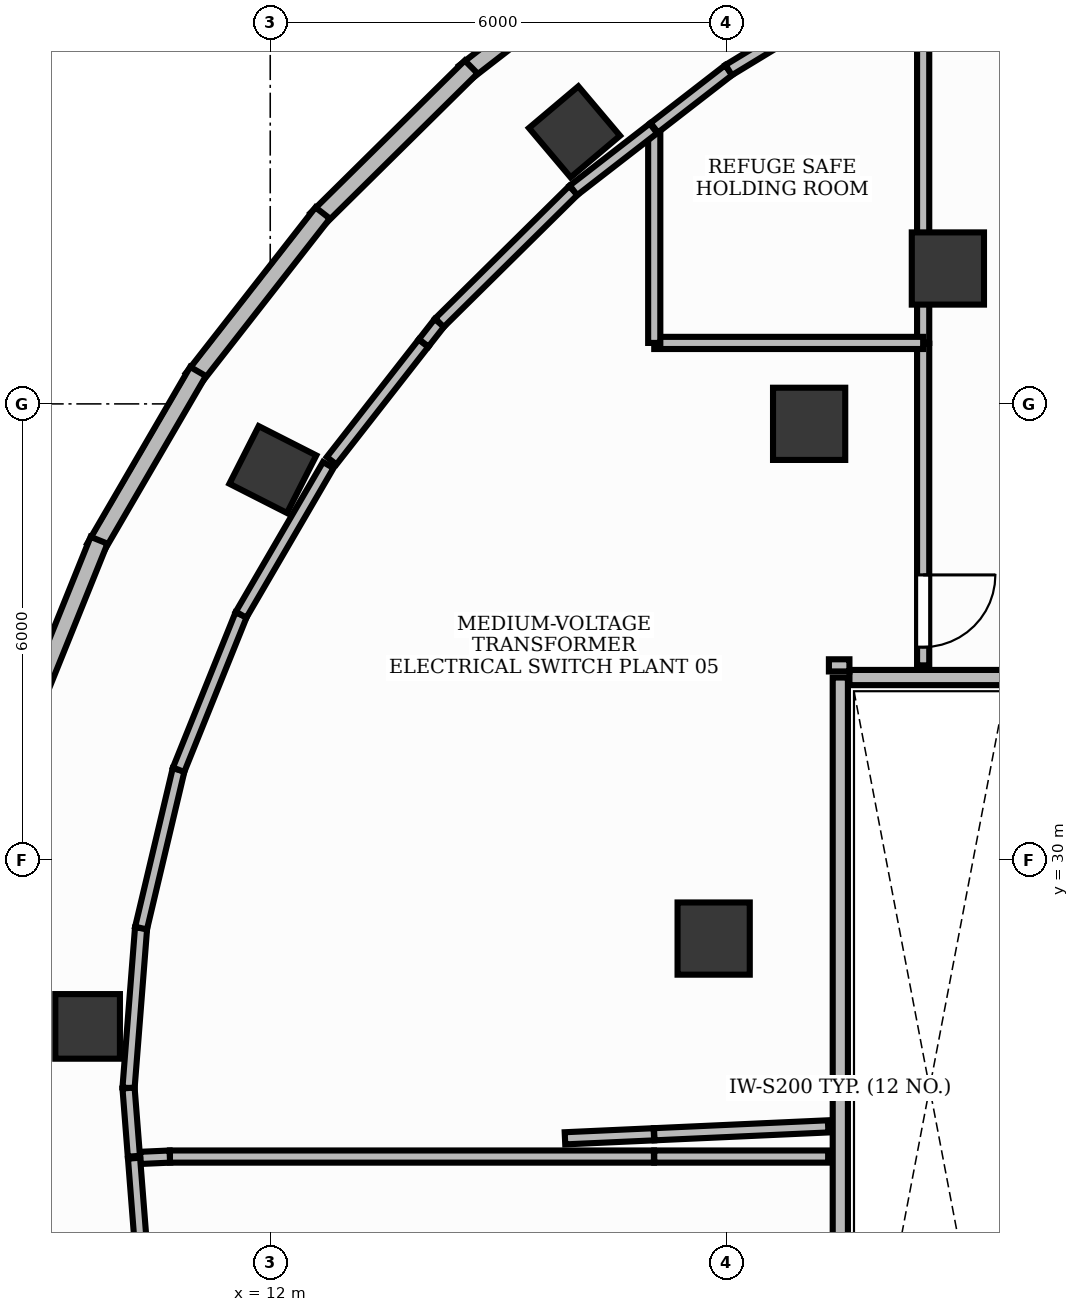
"""IFC4 building model, lengths in metres.
Left out: names, types, materials, properties, quantities, classifications, styles, units other than length and angle.
Written with IfcOpenShell. Run it as: python <this file> out.ifc"""

import sys

from ifc_helpers import new_model, si_unit, direction, frame, frame_2d, origin, origin_2d, place, context, subcontext, project, spatial, rectangle, extrude, element, fill, save


model = new_model("IFC4")
c1 = context("Model", 3, precision=1e-05, world=origin(), true_north=direction((0.0, 1.0)))
c2 = subcontext(c1, "Body", "Model", "MODEL_VIEW")
j1 = project(units=[si_unit("LENGTHUNIT", "METRE"), si_unit("PLANEANGLEUNIT", "RADIAN")], contexts=[c1])
p1 = place(None, origin())
s1 = spatial("IfcSite", under=j1, at=p1, CompositionType="ELEMENT")
p2 = place(p1, origin())
s2 = spatial("IfcBuilding", under=s1, at=p2, CompositionType="ELEMENT")
p3 = place(p2, frame((0.0, 0.0, 277.2)))
s3 = spatial("IfcBuildingStorey", under=s2, at=p3, CompositionType="ELEMENT", Elevation=277.2)
p4 = place(p3, frame((16.003, 39.579, -0.0), z_axis=(0.0, 0.0, 1.0), x_axis=(0.764246456939, 0.644924300253, 0.0)))
e1 = element("IfcColumn", 1, at=p4, inside=s3, PredefinedType="COLUMN", context=c2, shape_type="SweptSolid", body=[
    extrude(rectangle(XDim=0.85, YDim=0.85, at=origin_2d()), origin(), (0.0, 0.0, 1.0), 5.101),
])
p5 = place(p3, frame((20.915, 37.781, -0.0), z_axis=(0.0, 0.0, 1.0), x_axis=(1.0, 0.0, 0.0)))
e2 = element("IfcColumn", 2, at=p5, inside=s3, PredefinedType="COLUMN", context=c2, shape_type="SweptSolid", body=[
    extrude(rectangle(XDim=0.95, YDim=0.95, at=origin_2d()), origin(), (0.0, 0.0, 1.0), 5.101),
])
p6 = place(p3, frame((12.034, 35.136, -0.0), z_axis=(0.0, 0.0, 1.0), x_axis=(0.453057191132, 0.891481453292, 0.0)))
e3 = element("IfcColumn", 3, at=p6, inside=s3, PredefinedType="COLUMN", context=c2, shape_type="SweptSolid", body=[
    extrude(rectangle(XDim=0.85, YDim=0.85, at=origin_2d()), origin(), (0.0, 0.0, 1.0), 5.101),
])
p7 = place(p3, frame((19.09, 35.738, -0.0), z_axis=(0.0, 0.0, 1.0), x_axis=(1.0, 0.0, 0.0)))
e4 = element("IfcColumn", 4, at=p7, inside=s3, PredefinedType="COLUMN", context=c2, shape_type="SweptSolid", body=[
    extrude(rectangle(XDim=0.95, YDim=0.95, at=origin_2d()), origin(), (0.0, 0.0, 1.0), 5.101),
])
p8 = place(p3, frame((9.597, 27.81, -0.0), z_axis=(0.0, 0.0, 1.0), x_axis=(0.0, 1.0, 0.0)))
e5 = element("IfcColumn", 5, at=p8, inside=s3, PredefinedType="COLUMN", context=c2, shape_type="SweptSolid", body=[
    extrude(rectangle(XDim=0.85, YDim=0.85, at=origin_2d()), origin(), (0.0, 0.0, 1.0), 5.101),
])
p9 = place(p3, frame((17.834, 28.966, -0.0), z_axis=(0.0, 0.0, 1.0), x_axis=(1.0, 0.0, 0.0)))
e6 = element("IfcColumn", 6, at=p9, inside=s3, PredefinedType="COLUMN", context=c2, shape_type="SweptSolid", body=[
    extrude(rectangle(XDim=0.95, YDim=0.95, at=origin_2d()), origin(), (0.0, 0.0, 1.0), 5.101),
])
p10 = place(p3, frame((16.884, 42.159, 0.0), z_axis=(0.0, 0.0, 1.0), x_axis=(-0.790494374307, -0.61246930061, 0.0)))
e7 = element("IfcWall", 7, at=p10, inside=s3, PredefinedType="STANDARD", context=c2, shape_type="SweptSolid", body=[
    extrude(rectangle(XDim=2.943, YDim=0.24, at=frame_2d((1.471, 0.0))), origin(), (0.0, 0.0, 1.0), 5.1),
])
p11 = place(p3, frame((14.644, 40.432, 0.0), z_axis=(0.0, 0.0, 1.0), x_axis=(-0.711370453411, -0.702817243679, 0.0)))
e8 = element("IfcWall", 8, at=p11, inside=s3, PredefinedType="STANDARD", context=c2, shape_type="SweptSolid", body=[
    extrude(rectangle(XDim=2.854, YDim=0.24, at=frame_2d((1.427, 0.0))), origin(), (0.0, 0.0, 1.0), 5.1),
])
p12 = place(p3, frame((12.69, 38.512, 0.0), z_axis=(0.0, 0.0, 1.0), x_axis=(-0.615782644102, -0.78791607118, 0.0)))
e9 = element("IfcWall", 9, at=p12, inside=s3, PredefinedType="STANDARD", context=c2, shape_type="SweptSolid", body=[
    extrude(rectangle(XDim=2.769, YDim=0.24, at=frame_2d((1.384, 0.0))), origin(), (0.0, 0.0, 1.0), 5.1),
])
p13 = place(p3, frame((11.05, 36.427, 0.0), z_axis=(0.0, 0.0, 1.0), x_axis=(-0.503109244551, -0.864222823147, 0.0)))
e10 = element("IfcWall", 10, at=p13, inside=s3, PredefinedType="STANDARD", context=c2, shape_type="SweptSolid", body=[
    extrude(rectangle(XDim=2.691, YDim=0.24, at=frame_2d((1.345, 0.0))), origin(), (0.0, 0.0, 1.0), 5.1),
])
p14 = place(p3, frame((9.748, 34.206, 0.0), z_axis=(0.0, 0.0, 1.0), x_axis=(-0.373969625134, -0.927440952016, 0.0)))
e11 = element("IfcWall", 11, at=p14, inside=s3, PredefinedType="STANDARD", context=c2, shape_type="SweptSolid", body=[
    extrude(rectangle(XDim=2.626, YDim=0.24, at=frame_2d((1.313, 0.0))), origin(), (0.0, 0.0, 1.0), 5.1),
])
p15 = place(p3, frame((19.5, 21.6, 0.0), z_axis=(0.0, 0.0, 1.0), x_axis=(0.0, 1.0, 0.0)))
e12 = element("IfcWall", 12, at=p15, inside=s3, PredefinedType="PARTITIONING", context=c2, shape_type="SweptSolid", body=[
    extrude(rectangle(XDim=10.8, YDim=0.2, at=frame_2d((5.4, 0.0))), origin(), (0.0, 0.0, 1.0), 3.41),
])
p16 = place(p3, frame((19.62, 32.4, 0.0), z_axis=(0.0, 0.0, 1.0), x_axis=(1.0, 0.0, 0.0)))
e13 = element("IfcWall", 13, at=p16, inside=s3, PredefinedType="PARTITIONING", context=c2, shape_type="SweptSolid", body=[
    extrude(rectangle(XDim=2.11, YDim=0.2, at=frame_2d((1.055, 0.0))), origin(), (0.0, 0.0, 1.0), 3.41),
])
p17 = place(p3, frame((20.59, 36.792, 0.0), z_axis=(0.0, 0.0, 1.0), x_axis=(0.0, -1.0, 0.0)))
e14 = element("IfcWall", 14, at=p17, inside=s3, PredefinedType="PARTITIONING", context=c2, shape_type="SweptSolid", body=[
    extrude(rectangle(XDim=4.232, YDim=0.16, at=frame_2d((2.116, 0.0))), origin(), (0.0, 0.0, 1.0), 3.41),
])
p18 = place(p17, frame((3.042, 0.0, 0.0)))
e15 = element("IfcOpeningElement", 15, at=p18, cuts=e14, PredefinedType="OPENING", context=c2, shape_type="SweptSolid", body=[
    extrude(rectangle(XDim=0.95, YDim=2.15, at=frame_2d((0.475, 1.075))), frame((0.0, 0.095, 0.0), z_axis=(0.0, -1.0, 0.0), x_axis=(1.0, 0.0, 0.0)), (0.0, 0.0, 1.0), 0.19),
])
p19 = place(p3, frame((10.291, 26.08, 0.0), z_axis=(0.0, 0.0, 1.0), x_axis=(0.998982696556, 0.045095143669, 0.0)))
e16 = element("IfcWall", 16, at=p19, inside=s3, PredefinedType="PARTITIONING", context=c2, shape_type="SweptSolid", body=[
    extrude(rectangle(XDim=0.39, YDim=0.16, at=frame_2d((0.195, 0.0))), origin(), (0.0, 0.0, 1.0), 3.41),
])
p20 = place(p3, frame((10.681, 26.098, 0.0), z_axis=(0.0, 0.0, 1.0), x_axis=(1.0, 0.0, 0.0)))
e17 = element("IfcWall", 17, at=p20, inside=s3, PredefinedType="PARTITIONING", context=c2, shape_type="SweptSolid", body=[
    extrude(rectangle(XDim=6.367, YDim=0.16, at=frame_2d((3.184, 0.0))), origin(), (0.0, 0.0, 1.0), 3.41),
])
p21 = place(p3, frame((17.052, 26.098, 0.0), z_axis=(0.0, 0.0, 1.0), x_axis=(1.0, 0.0, 0.0)))
e18 = element("IfcWall", 18, at=p21, inside=s3, PredefinedType="PARTITIONING", context=c2, shape_type="SweptSolid", body=[
    extrude(rectangle(XDim=2.288, YDim=0.16, at=frame_2d((1.144, 0.0))), origin(), (0.0, 0.0, 1.0), 3.41),
])
p22 = place(p3, frame((10.301, 24.896, 0.0), z_axis=(0.0, 0.0, 1.0), x_axis=(-0.078179185526, 0.996939323605, 0.0)))
e19 = element("IfcWall", 19, at=p22, inside=s3, PredefinedType="PARTITIONING", context=c2, shape_type="SweptSolid", body=[
    extrude(rectangle(XDim=1.184, YDim=0.16, at=frame_2d((0.592, 0.0))), origin(), (0.0, 0.0, 1.0), 3.41),
])
p23 = place(p3, frame((20.59, 40.8, 0.0), z_axis=(0.0, 0.0, 1.0), x_axis=(0.0, -1.0, 0.0)))
e20 = element("IfcWall", 20, at=p23, inside=s3, PredefinedType="PARTITIONING", context=c2, shape_type="SweptSolid", body=[
    extrude(rectangle(XDim=3.998, YDim=0.16, at=frame_2d((1.999, 0.0))), origin(), (0.0, 0.0, 1.0), 3.41),
])
p24 = place(p3, frame((20.59, 36.802, 0.0), z_axis=(0.0, 0.0, 1.0), x_axis=(-1.0, 0.0, 0.0)))
e21 = element("IfcWall", 21, at=p24, inside=s3, PredefinedType="PARTITIONING", context=c2, shape_type="SweptSolid", body=[
    extrude(rectangle(XDim=3.538, YDim=0.16, at=frame_2d((1.769, 0.0))), origin(), (0.0, 0.0, 1.0), 3.41),
])
p25 = place(p3, frame((17.052, 36.802, 0.0), z_axis=(0.0, 0.0, 1.0), x_axis=(0.0, 1.0, 0.0)))
e22 = element("IfcWall", 22, at=p25, inside=s3, PredefinedType="PARTITIONING", context=c2, shape_type="SweptSolid", body=[
    extrude(rectangle(XDim=2.831, YDim=0.16, at=frame_2d((1.415, 0.0))), origin(), (0.0, 0.0, 1.0), 3.41),
])
p26 = place(p3, frame((17.052, 39.633, 0.0), z_axis=(0.0, 0.0, 1.0), x_axis=(0.790443669582, 0.612534737969, 0.0)))
e23 = element("IfcWall", 23, at=p26, inside=s3, PredefinedType="PARTITIONING", context=c2, shape_type="SweptSolid", body=[
    extrude(rectangle(XDim=1.239, YDim=0.16, at=frame_2d((0.62, 0.0))), origin(), (0.0, 0.0, 1.0), 3.41),
])
p27 = place(p3, frame((18.031, 40.392, 0.0), z_axis=(0.0, 0.0, 1.0), x_axis=(0.854517984413, 0.519421807701, 0.0)))
e24 = element("IfcWall", 24, at=p27, inside=s3, PredefinedType="PARTITIONING", context=c2, shape_type="SweptSolid", body=[
    extrude(rectangle(XDim=2.685, YDim=0.16, at=frame_2d((1.342, 0.0))), origin(), (0.0, 0.0, 1.0), 3.41),
])
p28 = place(p3, frame((10.136, 27.0, 0.0), z_axis=(0.0, 0.0, 1.0), x_axis=(0.078103302944, 0.996945271351, 0.0)))
e25 = element("IfcWall", 25, at=p28, inside=s3, PredefinedType="PARTITIONING", context=c2, shape_type="SweptSolid", body=[
    extrude(rectangle(XDim=2.11, YDim=0.16, at=frame_2d((1.055, 0.0))), origin(), (0.0, 0.0, 1.0), 3.41),
])
p29 = place(p3, frame((10.301, 29.104, 0.0), z_axis=(0.0, 0.0, 1.0), x_axis=(0.230736371134, 0.973016303582, 0.0)))
e26 = element("IfcWall", 26, at=p29, inside=s3, PredefinedType="PARTITIONING", context=c2, shape_type="SweptSolid", body=[
    extrude(rectangle(XDim=2.141, YDim=0.16, at=frame_2d((1.07, 0.0))), origin(), (0.0, 0.0, 1.0), 3.41),
])
p30 = place(p3, frame((10.794, 31.187, 0.0), z_axis=(0.0, 0.0, 1.0), x_axis=(0.373992983989, 0.927431532743, 0.0)))
e27 = element("IfcWall", 27, at=p30, inside=s3, PredefinedType="PARTITIONING", context=c2, shape_type="SweptSolid", body=[
    extrude(rectangle(XDim=2.199, YDim=0.16, at=frame_2d((1.099, 0.0))), origin(), (0.0, 0.0, 1.0), 3.41),
])
p31 = place(p3, frame((11.617, 33.226, 0.0), z_axis=(0.0, 0.0, 1.0), x_axis=(0.503091477378, 0.864233166101, 0.0)))
e28 = element("IfcWall", 28, at=p31, inside=s3, PredefinedType="PARTITIONING", context=c2, shape_type="SweptSolid", body=[
    extrude(rectangle(XDim=2.279, YDim=0.16, at=frame_2d((1.139, 0.0))), origin(), (0.0, 0.0, 1.0), 3.41),
])
p32 = place(p3, frame((12.808, 35.252, 0.0), z_axis=(0.0, 0.0, 1.0), x_axis=(0.615774471154, 0.787922458542, 0.0)))
e29 = element("IfcWall", 29, at=p32, inside=s3, PredefinedType="PARTITIONING", context=c2, shape_type="SweptSolid", body=[
    extrude(rectangle(XDim=1.961, YDim=0.16, at=frame_2d((0.981, 0.0))), origin(), (0.0, 0.0, 1.0), 3.41),
])
p33 = place(p3, frame((14.019, 36.802, 0.0), z_axis=(0.0, 0.0, 1.0), x_axis=(0.615799042006, 0.787903255397, 0.0)))
e30 = element("IfcWall", 30, at=p33, inside=s3, PredefinedType="PARTITIONING", context=c2, shape_type="SweptSolid", body=[
    extrude(rectangle(XDim=0.336, YDim=0.16, at=frame_2d((0.168, 0.0))), origin(), (0.0, 0.0, 1.0), 3.41),
])
p34 = place(p3, frame((14.226, 37.067, 0.0), z_axis=(0.0, 0.0, 1.0), x_axis=(0.711428467845, 0.702758518369, 0.0)))
e31 = element("IfcWall", 31, at=p34, inside=s3, PredefinedType="PARTITIONING", context=c2, shape_type="SweptSolid", body=[
    extrude(rectangle(XDim=2.478, YDim=0.16, at=frame_2d((1.239, 0.0))), origin(), (0.0, 0.0, 1.0), 3.41),
])
p35 = place(p3, frame((15.989, 38.809, 0.0), z_axis=(0.0, 0.0, 1.0), x_axis=(0.790486056545, 0.612480035927, 0.0)))
e32 = element("IfcWall", 32, at=p35, inside=s3, PredefinedType="PARTITIONING", context=c2, shape_type="SweptSolid", body=[
    extrude(rectangle(XDim=1.332, YDim=0.16, at=frame_2d((0.666, 0.0))), origin(), (0.0, 0.0, 1.0), 3.41),
])
p36 = place(p3, frame((19.62, 32.56, 0.0), z_axis=(0.0, 0.0, 1.0), x_axis=(-1.0, 0.0, 0.0)))
e33 = element("IfcWall", 33, at=p36, inside=s3, PredefinedType="PARTITIONING", context=c2, shape_type="SweptSolid", body=[
    extrude(rectangle(XDim=0.27, YDim=0.16, at=frame_2d((0.135, 0.0))), origin(), (0.0, 0.0, 1.0), 3.41),
])
p37 = place(p3, frame((19.34, 26.495, 0.0), z_axis=(0.0, 0.0, 1.0), x_axis=(-0.99897293198, -0.04531093875, 0.0)))
e34 = element("IfcWall", 34, at=p37, inside=s3, PredefinedType="PARTITIONING", context=c2, shape_type="SweptSolid", body=[
    extrude(rectangle(XDim=2.29, YDim=0.16, at=frame_2d((1.145, 0.0))), origin(), (0.0, 0.0, 1.0), 3.41),
])
p38 = place(p3, frame((17.048, 26.391, 0.0), z_axis=(0.0, 0.0, 1.0), x_axis=(-0.998967680738, -0.045426565374, 0.0)))
e35 = element("IfcWall", 35, at=p38, inside=s3, PredefinedType="PARTITIONING", context=c2, shape_type="SweptSolid", body=[
    extrude(rectangle(XDim=1.172, YDim=0.16, at=frame_2d((0.586, 0.0))), origin(), (0.0, 0.0, 1.0), 3.41),
])
p39 = place(p3, frame((10.206, 26.102, 0.0), z_axis=(0.0, 0.0, 1.0), x_axis=(-0.078085569275, 0.996946660494, 0.0)))
e36 = element("IfcWall", 36, at=p39, inside=s3, PredefinedType="PARTITIONING", context=c2, shape_type="SweptSolid", body=[
    extrude(rectangle(XDim=0.9, YDim=0.16, at=frame_2d((0.45, 0.0))), origin(), (0.0, 0.0, 1.0), 3.41),
])
p40 = place(p18, origin())
e37 = element("IfcDoor", 37, at=p40, inside=s3, OperationType="SINGLE_SWING_LEFT", PredefinedType="DOOR", context=c2, shape_type="SweptSolid", body=[
    extrude(rectangle(XDim=0.95, YDim=2.15, at=frame_2d((0.475, 1.075))), frame((0.0, 0.025, 0.0), z_axis=(0.0, -1.0, 0.0), x_axis=(1.0, 0.0, 0.0)), (0.0, 0.0, 1.0), 0.05),
])
fill(e15, e37)
save(model, sys.argv[1])
